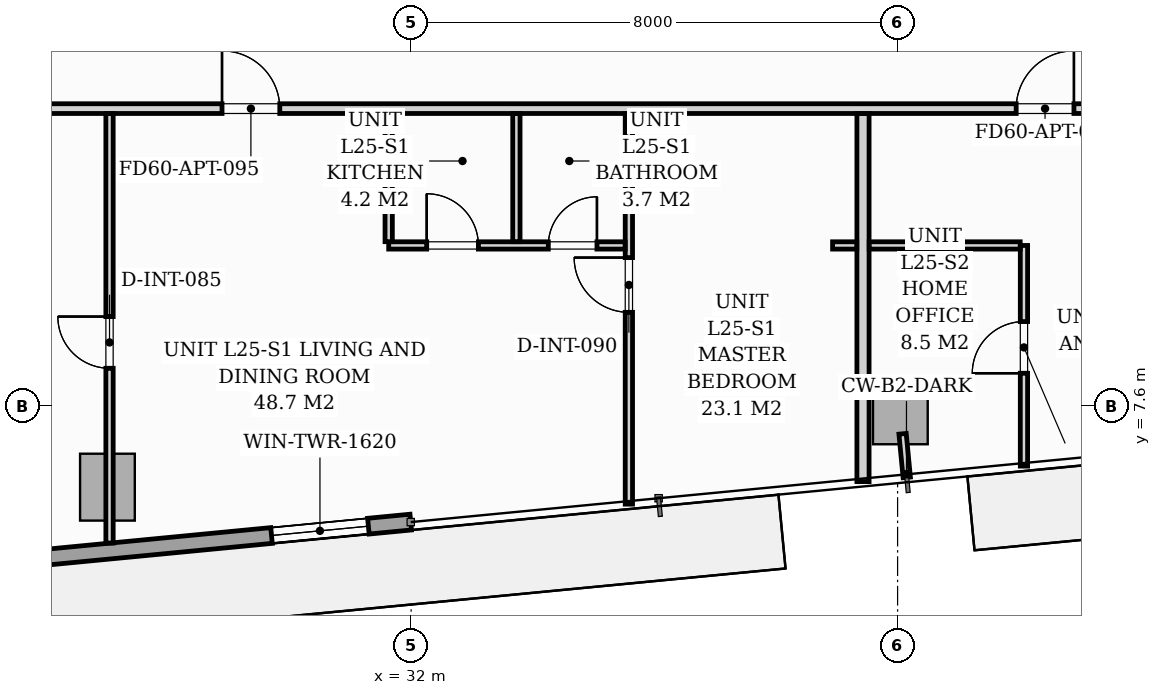
"""IFC4 building model, lengths in metres.
Left out: names, types, materials, properties, quantities, classifications, styles, units other than length and angle.
Written with IfcOpenShell. Run it as: python <this file> out.ifc"""

import sys

from ifc_helpers import new_model, si_unit, direction, frame, frame_2d, origin, origin_2d, place, context, subcontext, project, spatial, rectangle, extrude, source, transform, mapped, element, fill, save


model = new_model("IFC4")
c1 = context("Model", 3, precision=1e-05, world=origin(), true_north=direction((0.0, 1.0)))
c2 = subcontext(c1, "Body", "Model", "MODEL_VIEW")
j1 = project(units=[si_unit("LENGTHUNIT", "METRE"), si_unit("PLANEANGLEUNIT", "RADIAN")], contexts=[c1])
p1 = place(None, origin())
s1 = spatial("IfcSite", under=j1, at=p1, CompositionType="ELEMENT")
p2 = place(p1, origin())
s2 = spatial("IfcBuilding", under=s1, at=p2, CompositionType="ELEMENT")
p3 = place(p2, frame((0.0, 0.0, 90.6)))
s3 = spatial("IfcBuildingStorey", under=s2, at=p3, CompositionType="ELEMENT", Elevation=90.6)
m1 = source(origin(), c2, "Body", "SweptSolid", [
    extrude(rectangle(XDim=0.9, YDim=1.1, at=origin_2d()), origin(), (0.0, 0.0, 1.0), 3.196),
])
for number, where, z_axis, x_axis in (
    (1, (27.006, 6.265, 0.002), (0.0, 0.0, 1.0), (0.995, 0.096, 0.0)),
    (2, (40.045, 7.521, 0.002), (0.0, 0.0, 1.0), (0.995, 0.096, 0.0)),
):
    element("IfcColumn", number, at=place(p3, frame(where, z_axis=z_axis, x_axis=x_axis)), inside=s3, PredefinedType="COLUMN", context=c2, shape_type="MappedRepresentation", body=[
        mapped(m1, transform((0.0, 0.0, 0.0), scale=1.0)),
    ])
p4 = place(p3, frame((31.994, 5.69, 0.0), z_axis=(0.0, 0.0, 1.0), x_axis=(-0.995396521236, -0.095842399342, 0.0)))
e3 = element("IfcWall", 3, at=p4, inside=s3, PredefinedType="STANDARD", context=c2, shape_type="SweptSolid", body=[
    extrude(rectangle(XDim=19.11, YDim=0.26, at=frame_2d((9.555, 0.0))), origin(), (0.0, 0.0, 1.0), 2.94),
])
p5 = place(p4, frame((7.49, 0.0, 0.0)))
e4 = element("IfcOpeningElement", 4, at=p5, cuts=e3, PredefinedType="OPENING", context=c2, shape_type="SweptSolid", body=[
    extrude(rectangle(XDim=1.8, YDim=2.06, at=frame_2d((0.9, 1.03))), frame((0.0, 0.14, 0.0), z_axis=(0.0, -1.0, 0.0), x_axis=(1.0, 0.0, 0.0)), (0.0, 0.0, 1.0), 0.28),
])
p6 = place(p4, frame((0.7, 0.0, 0.65)))
e5 = element("IfcOpeningElement", 5, at=p6, cuts=e3, PredefinedType="OPENING", context=c2, shape_type="SweptSolid", body=[
    extrude(rectangle(XDim=1.6, YDim=1.5, at=frame_2d((0.8, 0.75))), frame((0.0, 0.14, 0.0), z_axis=(0.0, -1.0, 0.0), x_axis=(1.0, 0.0, 0.0)), (0.0, 0.0, 1.0), 0.28),
])
p7 = place(p3, frame((17.7, 12.49, 0.0), z_axis=(0.0, 0.0, 1.0), x_axis=(1.0, 0.0, 0.0)))
e6 = element("IfcWall", 6, at=p7, inside=s3, PredefinedType="PARTITIONING", context=c2, shape_type="SweptSolid", body=[
    extrude(rectangle(XDim=35.4, YDim=0.16, at=frame_2d((17.7, 0.0))), origin(), (0.0, 0.0, 1.0), 2.94),
])
p8 = place(p7, frame((11.19, 0.0, 0.0)))
e7 = element("IfcOpeningElement", 7, at=p8, cuts=e6, PredefinedType="OPENING", context=c2, shape_type="SweptSolid", body=[
    extrude(rectangle(XDim=0.95, YDim=2.06, at=frame_2d((0.475, 1.03))), frame((0.0, 0.09, 0.0), z_axis=(0.0, -1.0, 0.0), x_axis=(1.0, 0.0, 0.0)), (0.0, 0.0, 1.0), 0.18),
])
p9 = place(p7, frame((24.25, 0.0, 0.0)))
e8 = element("IfcOpeningElement", 8, at=p9, cuts=e6, PredefinedType="OPENING", context=c2, shape_type="SweptSolid", body=[
    extrude(rectangle(XDim=0.95, YDim=2.06, at=frame_2d((0.475, 1.03))), frame((0.0, 0.09, 0.0), z_axis=(0.0, -1.0, 0.0), x_axis=(1.0, 0.0, 0.0)), (0.0, 0.0, 1.0), 0.18),
])
p10 = place(p3, frame((35.581, 5.986, 0.0), z_axis=(0.0, 0.0, 1.0), x_axis=(0.0, 1.0, 0.0)))
e9 = element("IfcWall", 9, at=p10, inside=s3, PredefinedType="PARTITIONING", context=c2, shape_type="SweptSolid", body=[
    extrude(rectangle(XDim=6.422, YDim=0.12, at=frame_2d((3.211, 0.0))), origin(), (0.0, 0.0, 1.0), 2.94),
])
p11 = place(p10, frame((3.154, 0.0, 0.0)))
e10 = element("IfcOpeningElement", 10, at=p11, cuts=e9, PredefinedType="OPENING", context=c2, shape_type="SweptSolid", body=[
    extrude(rectangle(XDim=0.9, YDim=2.05, at=frame_2d((0.45, 1.025))), frame((0.0, 0.07, 0.0), z_axis=(0.0, -1.0, 0.0), x_axis=(1.0, 0.0, 0.0)), (0.0, 0.0, 1.0), 0.14),
])
p12 = place(p3, frame((31.631, 10.24, 0.0), z_axis=(0.0, 0.0, 1.0), x_axis=(1.0, 0.0, 0.0)))
e11 = element("IfcWall", 11, at=p12, inside=s3, PredefinedType="PARTITIONING", context=c2, shape_type="SweptSolid", body=[
    extrude(rectangle(XDim=3.888, YDim=0.12, at=frame_2d((1.944, 0.0))), origin(), (0.0, 0.0, 1.0), 2.94),
])
p13 = place(p12, frame((0.625, 0.0, 0.0)))
e12 = element("IfcOpeningElement", 12, at=p13, cuts=e11, PredefinedType="OPENING", context=c2, shape_type="SweptSolid", body=[
    extrude(rectangle(XDim=0.85, YDim=2.05, at=frame_2d((0.425, 1.025))), frame((0.0, 0.07, 0.0), z_axis=(0.0, -1.0, 0.0), x_axis=(1.0, 0.0, 0.0)), (0.0, 0.0, 1.0), 0.14),
])
p14 = place(p12, frame((2.625, 0.0, 0.0)))
e13 = element("IfcOpeningElement", 13, at=p14, cuts=e11, PredefinedType="OPENING", context=c2, shape_type="SweptSolid", body=[
    extrude(rectangle(XDim=0.8, YDim=2.02, at=frame_2d((0.4, 1.01))), frame((0.0, 0.07, 0.0), z_axis=(0.0, -1.0, 0.0), x_axis=(1.0, 0.0, 0.0)), (0.0, 0.0, 1.0), 0.14),
])
for number, where, z_axis, x_axis in (
    (14, (33.731, 10.302, 0.0), (0.0, 0.0, 1.0), (0.0, 1.0, 0.0)),
    (15, (31.631, 10.302, 0.0), (0.0, 0.0, 1.0), (0.0, 1.0, 0.0)),
):
    element("IfcWall", number, at=place(p3, frame(where, z_axis=z_axis, x_axis=x_axis)), inside=s3, PredefinedType="PARTITIONING", context=c2, shape_type="SweptSolid", body=[
        extrude(rectangle(XDim=2.106, YDim=0.12, at=frame_2d((1.053, 0.0))), origin(), (0.0, 0.0, 1.0), 2.94),
    ])
p15 = place(p3, frame((27.04, 5.346, 0.0), z_axis=(0.0, 0.0, 1.0), x_axis=(0.0, 1.0, 0.0)))
e16 = element("IfcWall", 16, at=p15, inside=s3, PredefinedType="PARTITIONING", context=c2, shape_type="SweptSolid", body=[
    extrude(rectangle(XDim=7.062, YDim=0.12, at=frame_2d((3.531, 0.0))), origin(), (0.0, 0.0, 1.0), 2.216),
])
p16 = place(p15, frame((2.874, 0.0, 0.0)))
e17 = element("IfcOpeningElement", 17, at=p16, cuts=e16, PredefinedType="OPENING", context=c2, shape_type="SweptSolid", body=[
    extrude(rectangle(XDim=0.85, YDim=2.05, at=frame_2d((0.425, 1.025))), frame((0.0, 0.07, 0.0), z_axis=(0.0, -1.0, 0.0), x_axis=(1.0, 0.0, 0.0)), (0.0, 0.0, 1.0), 0.14),
])
p17 = place(p3, frame((39.431, 6.356, 0.0), z_axis=(0.0, 0.0, 1.0), x_axis=(0.0, 1.0, 0.0)))
e18 = element("IfcWall", 18, at=p17, inside=s3, PredefinedType="PARTITIONING", context=c2, shape_type="SweptSolid", body=[
    extrude(rectangle(XDim=6.052, YDim=0.2, at=frame_2d((3.026, 0.0))), origin(), (0.0, 0.0, 1.0), 2.94),
])
p18 = place(p3, frame((42.078, 6.611, 0.0), z_axis=(0.0, 0.0, 1.0), x_axis=(0.0, 1.0, 0.0)))
e19 = element("IfcWall", 19, at=p18, inside=s3, PredefinedType="PARTITIONING", context=c2, shape_type="SweptSolid", body=[
    extrude(rectangle(XDim=3.629, YDim=0.12, at=frame_2d((1.814, 0.0))), origin(), (0.0, 0.0, 1.0), 2.94),
])
p19 = place(p18, frame((1.527, 0.0, 0.0)))
e20 = element("IfcOpeningElement", 20, at=p19, cuts=e19, PredefinedType="OPENING", context=c2, shape_type="SweptSolid", body=[
    extrude(rectangle(XDim=0.85, YDim=2.05, at=frame_2d((0.425, 1.025))), frame((0.0, 0.07, 0.0), z_axis=(0.0, -1.0, 0.0), x_axis=(1.0, 0.0, 0.0)), (0.0, 0.0, 1.0), 0.14),
])
p20 = place(p3, frame((38.931, 10.24, 0.0), z_axis=(0.0, 0.0, 1.0), x_axis=(1.0, 0.0, 0.0)))
e21 = element("IfcWall", 21, at=p20, inside=s3, PredefinedType="PARTITIONING", context=c2, shape_type="SweptSolid", body=[
    extrude(rectangle(XDim=0.398, YDim=0.12, at=frame_2d((0.199, 0.0))), origin(), (0.0, 0.0, 1.0), 2.94),
])
p21 = place(p3, frame((39.533, 10.24, 0.0), z_axis=(0.0, 0.0, 1.0), x_axis=(1.0, 0.0, 0.0)))
e22 = element("IfcWall", 22, at=p21, inside=s3, PredefinedType="PARTITIONING", context=c2, shape_type="SweptSolid", body=[
    extrude(rectangle(XDim=2.483, YDim=0.12, at=frame_2d((1.242, 0.0))), origin(), (0.0, 0.0, 1.0), 2.94),
])
p22 = place(p3, frame((40.082, 7.142, 0.0), z_axis=(0.0, 0.0, 1.0), x_axis=(0.095944965663, -0.995386640238, 0.0)))
e23 = element("IfcWall", 23, at=p22, inside=s3, PredefinedType="PARTITIONING", context=c2, shape_type="SweptSolid", body=[
    extrude(rectangle(XDim=0.72, YDim=0.12, at=frame_2d((0.36, 0.0))), origin(), (0.0, 0.0, 1.0), 2.94),
])
m2 = source(origin(), c2, "Body", "SweptSolid", [
    extrude(rectangle(XDim=1.6, YDim=1.5, at=frame_2d((0.8, 0.75))), frame((0.0, 0.03, 0.0), z_axis=(0.0, -1.0, 0.0), x_axis=(1.0, 0.0, 0.0)), (0.0, 0.0, 1.0), 0.06),
])
p23 = place(p6, origin())
e24 = element("IfcWindow", 24, at=p23, inside=s3, PartitioningType="SINGLE_PANEL", PredefinedType="WINDOW", context=c2, shape_type="MappedRepresentation", body=[
    mapped(m2, transform((0.0, 0.0, 0.0), scale=1.0)),
])
fill(e5, e24)
m3 = source(origin(), c2, "Body", "SweptSolid", [
    extrude(rectangle(XDim=0.85, YDim=2.05, at=frame_2d((0.425, 1.025))), frame((0.0, 0.025, 0.0), z_axis=(0.0, -1.0, 0.0), x_axis=(1.0, 0.0, 0.0)), (0.0, 0.0, 1.0), 0.05),
])
p24 = place(p16, origin())
e25 = element("IfcDoor", 25, at=p24, inside=s3, OperationType="SINGLE_SWING_RIGHT", PredefinedType="DOOR", context=c2, shape_type="MappedRepresentation", body=[
    mapped(m3, transform((0.0, 0.0, 0.0), scale=1.0)),
])
fill(e17, e25)
m4 = source(origin(), c2, "Body", "SweptSolid", [
    extrude(rectangle(XDim=0.95, YDim=2.06, at=frame_2d((0.475, 1.03))), frame((0.0, 0.025, 0.0), z_axis=(0.0, -1.0, 0.0), x_axis=(1.0, 0.0, 0.0)), (0.0, 0.0, 1.0), 0.05),
])
p25 = place(p8, origin())
e26 = element("IfcDoor", 26, at=p25, inside=s3, OperationType="SINGLE_SWING_LEFT", PredefinedType="DOOR", context=c2, shape_type="MappedRepresentation", body=[
    mapped(m4, transform((0.0, 0.0, 0.0), scale=1.0)),
])
fill(e7, e26)
m5 = source(origin(), c2, "Body", "SweptSolid", [
    extrude(rectangle(XDim=0.9, YDim=2.05, at=frame_2d((0.45, 1.025))), frame((0.0, 0.025, 0.0), z_axis=(0.0, -1.0, 0.0), x_axis=(1.0, 0.0, 0.0)), (0.0, 0.0, 1.0), 0.05),
])
p26 = place(p11, origin())
e27 = element("IfcDoor", 27, at=p26, inside=s3, OperationType="SINGLE_SWING_RIGHT", PredefinedType="DOOR", context=c2, shape_type="MappedRepresentation", body=[
    mapped(m5, transform((0.0, 0.0, 0.0), scale=1.0)),
])
fill(e10, e27)
p27 = place(p13, origin())
e28 = element("IfcDoor", 28, at=p27, inside=s3, OperationType="SINGLE_SWING_LEFT", PredefinedType="DOOR", context=c2, shape_type="MappedRepresentation", body=[
    mapped(m3, transform((0.0, 0.0, 0.0), scale=1.0)),
])
fill(e12, e28)
m6 = source(origin(), c2, "Body", "SweptSolid", [
    extrude(rectangle(XDim=0.8, YDim=2.02, at=frame_2d((0.4, 1.01))), frame((0.0, 0.025, 0.0), z_axis=(0.0, -1.0, 0.0), x_axis=(1.0, 0.0, 0.0)), (0.0, 0.0, 1.0), 0.05),
])
p28 = place(p14, origin())
e29 = element("IfcDoor", 29, at=p28, inside=s3, OperationType="SINGLE_SWING_RIGHT", PredefinedType="DOOR", context=c2, shape_type="MappedRepresentation", body=[
    mapped(m6, transform((0.0, 0.0, 0.0), scale=1.0)),
])
fill(e13, e29)
p29 = place(p19, origin())
e30 = element("IfcDoor", 30, at=p29, inside=s3, OperationType="SINGLE_SWING_LEFT", PredefinedType="DOOR", context=c2, shape_type="MappedRepresentation", body=[
    mapped(m3, transform((0.0, 0.0, 0.0), scale=1.0)),
])
fill(e20, e30)
p30 = place(p9, origin())
e31 = element("IfcDoor", 31, at=p30, inside=s3, OperationType="SINGLE_SWING_RIGHT", PredefinedType="DOOR", context=c2, shape_type="MappedRepresentation", body=[
    mapped(m4, transform((0.0, 0.0, 0.0), scale=1.0)),
])
fill(e8, e31)
save(model, sys.argv[1])
